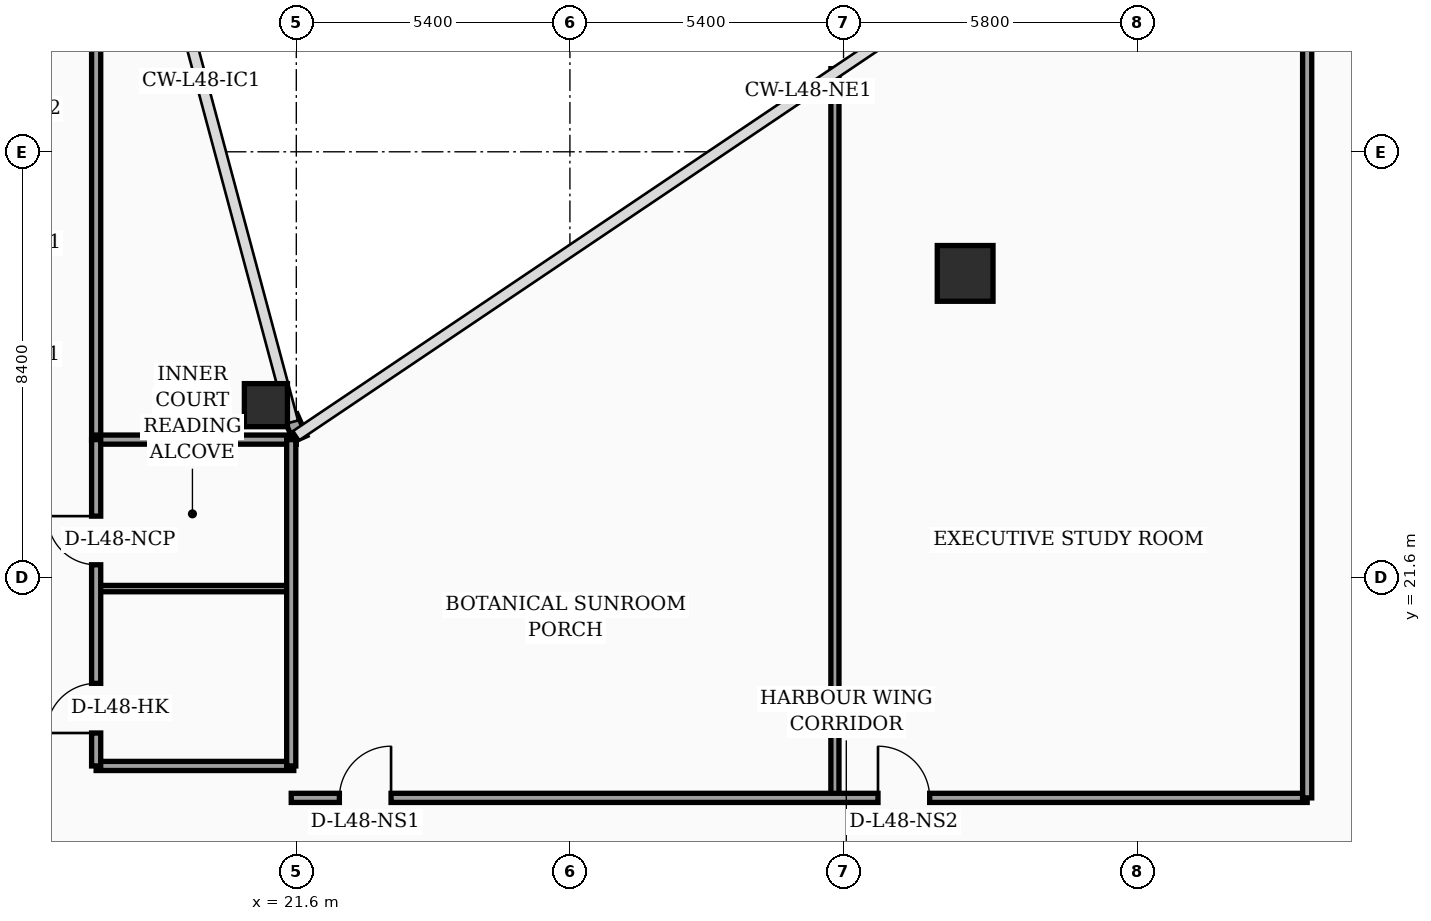
"""IFC4 building model, lengths in metres.
Left out: names, types, materials, properties, quantities, classifications, styles, units other than length and angle.
Written with IfcOpenShell. Run it as: python <this file> out.ifc"""

import sys

from ifc_helpers import new_model, si_unit, direction, frame, frame_2d, origin, origin_2d, place, context, subcontext, project, spatial, rectangle, hollow_rectangle, circle, extrude, element, fill, save


model = new_model("IFC4")
c1 = context("Model", 3, precision=1e-05, world=origin(), true_north=direction((0.0, 1.0)))
c2 = subcontext(c1, "Body", "Model", "MODEL_VIEW")
j1 = project(units=[si_unit("LENGTHUNIT", "METRE"), si_unit("PLANEANGLEUNIT", "RADIAN")], contexts=[c1])
p1 = place(None, origin())
s1 = spatial("IfcSite", under=j1, at=p1, CompositionType="ELEMENT")
p2 = place(p1, origin())
s2 = spatial("IfcBuilding", under=s1, at=p2, CompositionType="ELEMENT")
p3 = place(p2, frame((0.0, 0.0, 195.1)))
s3 = spatial("IfcBuildingStorey", under=s2, at=p3, CompositionType="ELEMENT", Elevation=195.1)
p4 = place(p3, frame((21.0, 25.0, 0.0), z_axis=(0.0, 0.0, 1.0), x_axis=(1.0, 0.0, 0.0)))
e1 = element("IfcColumn", 1, at=p4, inside=s3, PredefinedType="COLUMN", context=c2, shape_type="SweptSolid", body=[
    extrude(hollow_rectangle(XDim=0.85, YDim=0.85, WallThickness=0.036, at=origin_2d()), origin(), (0.0, 0.0, 1.0), 4.05),
])
p5 = place(p3, frame((34.8, 27.6, 0.0), z_axis=(0.0, 0.0, 1.0), x_axis=(1.0, 0.0, 0.0)))
e2 = element("IfcColumn", 2, at=p5, inside=s3, PredefinedType="COLUMN", context=c2, shape_type="SweptSolid", body=[
    extrude(circle(Radius=0.55, at=origin_2d()), origin(), (0.0, 0.0, 1.0), 4.05),
])
p6 = place(p3, frame((21.68, 24.34, 0.0), z_axis=(0.0, 0.0, 1.0), x_axis=(-0.40758134973, 0.913168901875, 0.0)))
e3 = element("IfcWall", 3, at=p6, inside=s3, PredefinedType="SOLIDWALL", context=c2, shape_type="SweptSolid", body=[
    extrude(rectangle(XDim=0.471, YDim=0.28, at=frame_2d((0.235, 0.0))), origin(), (0.0, 0.0, 1.0), 4.05),
])
p7 = place(p3, frame((17.65, 24.3, 0.0), z_axis=(0.0, 0.0, 1.0), x_axis=(0.0, 1.0, 0.0)))
e4 = element("IfcWall", 4, at=p7, inside=s3, PredefinedType="PARTITIONING", context=c2, shape_type="SweptSolid", body=[
    extrude(rectangle(XDim=18.15, YDim=0.18, at=frame_2d((9.075, 0.0))), origin(), (0.0, 0.0, 1.0), 3.45),
])
p8 = place(p3, frame((17.65, 17.88, 0.0), z_axis=(0.0, 0.0, 1.0), x_axis=(1.0, 0.0, 0.0)))
e5 = element("IfcWall", 5, at=p8, inside=s3, PredefinedType="PARTITIONING", context=c2, shape_type="SweptSolid", body=[
    extrude(rectangle(XDim=3.9, YDim=0.18, at=frame_2d((1.95, 0.0))), origin(), (0.0, 0.0, 1.0), 4.05),
])
p9 = place(p3, frame((17.65, 21.38, 0.0), z_axis=(0.0, 0.0, 1.0), x_axis=(1.0, 0.0, 0.0)))
e6 = element("IfcWall", 6, at=p9, inside=s3, PredefinedType="PARTITIONING", context=c2, shape_type="SweptSolid", body=[
    extrude(rectangle(XDim=3.9, YDim=0.125, at=frame_2d((1.95, 0.0))), origin(), (0.0, 0.0, 1.0), 4.05),
])
p10 = place(p3, frame((17.65, 24.32, 0.0), z_axis=(0.0, 0.0, 1.0), x_axis=(1.0, 0.0, 0.0)))
e7 = element("IfcWall", 7, at=p10, inside=s3, PredefinedType="PARTITIONING", context=c2, shape_type="SweptSolid", body=[
    extrude(rectangle(XDim=3.95, YDim=0.18, at=frame_2d((1.975, 0.0))), origin(), (0.0, 0.0, 1.0), 4.05),
])
p11 = place(p3, frame((21.5, 17.88, 0.0), z_axis=(0.0, 0.0, 1.0), x_axis=(0.0, 1.0, 0.0)))
e8 = element("IfcWall", 8, at=p11, inside=s3, PredefinedType="PARTITIONING", context=c2, shape_type="SweptSolid", body=[
    extrude(rectangle(XDim=6.44, YDim=0.18, at=frame_2d((3.22, 0.0))), origin(), (0.0, 0.0, 1.0), 4.05),
])
p12 = place(p3, frame((17.65, 17.88, 0.0), z_axis=(0.0, 0.0, 1.0), x_axis=(0.0, 1.0, 0.0)))
e9 = element("IfcWall", 9, at=p12, inside=s3, PredefinedType="PARTITIONING", context=c2, shape_type="SweptSolid", body=[
    extrude(rectangle(XDim=6.44, YDim=0.18, at=frame_2d((3.22, 0.0))), origin(), (0.0, 0.0, 1.0), 4.05),
])
p13 = place(p12, frame((0.65, 0.0, 0.0)))
e10 = element("IfcOpeningElement", 10, at=p13, cuts=e9, PredefinedType="OPENING", context=c2, shape_type="SweptSolid", body=[
    extrude(rectangle(XDim=0.98, YDim=2.15, at=frame_2d((0.49, 1.075))), frame((0.0, 0.1, 0.0), z_axis=(0.0, -1.0, 0.0), x_axis=(1.0, 0.0, 0.0)), (0.0, 0.0, 1.0), 0.2),
])
p14 = place(p12, frame((3.97, 0.0, 0.0)))
e11 = element("IfcOpeningElement", 11, at=p14, cuts=e9, PredefinedType="OPENING", context=c2, shape_type="SweptSolid", body=[
    extrude(rectangle(XDim=0.96, YDim=2.2, at=frame_2d((0.48, 1.1))), frame((0.0, 0.1, 0.0), z_axis=(0.0, -1.0, 0.0), x_axis=(1.0, 0.0, 0.0)), (0.0, 0.0, 1.0), 0.2),
])
p15 = place(p3, frame((32.23, 17.25, 0.0), z_axis=(0.0, 0.0, 1.0), x_axis=(0.0, 1.0, 0.0)))
e12 = element("IfcWall", 12, at=p15, inside=s3, PredefinedType="PARTITIONING", context=c2, shape_type="SweptSolid", body=[
    extrude(rectangle(XDim=14.39, YDim=0.16, at=frame_2d((7.195, 0.0))), origin(), (0.0, 0.0, 1.0), 2.35),
])
p16 = place(p3, frame((21.5, 17.25, 0.0), z_axis=(0.0, 0.0, 1.0), x_axis=(1.0, 0.0, 0.0)))
e13 = element("IfcWall", 13, at=p16, inside=s3, PredefinedType="PARTITIONING", context=c2, shape_type="SweptSolid", body=[
    extrude(rectangle(XDim=20.05, YDim=0.18, at=frame_2d((10.025, 0.0))), origin(), (0.0, 0.0, 1.0), 2.35),
])
p17 = place(p16, frame((0.95, 0.0, 0.0)))
e14 = element("IfcOpeningElement", 14, at=p17, cuts=e13, PredefinedType="OPENING", context=c2, shape_type="SweptSolid", body=[
    extrude(rectangle(XDim=1.02, YDim=2.2, at=frame_2d((0.51, 1.1))), frame((0.0, 0.1, 0.0), z_axis=(0.0, -1.0, 0.0), x_axis=(1.0, 0.0, 0.0)), (0.0, 0.0, 1.0), 0.2),
])
p18 = place(p16, frame((11.58, 0.0, 0.0)))
e15 = element("IfcOpeningElement", 15, at=p18, cuts=e13, PredefinedType="OPENING", context=c2, shape_type="SweptSolid", body=[
    extrude(rectangle(XDim=1.02, YDim=2.2, at=frame_2d((0.51, 1.1))), frame((0.0, 0.1, 0.0), z_axis=(0.0, -1.0, 0.0), x_axis=(1.0, 0.0, 0.0)), (0.0, 0.0, 1.0), 0.2),
])
p19 = place(p3, frame((41.55, 17.25, 0.0), z_axis=(0.0, 0.0, 1.0), x_axis=(0.0, 1.0, 0.0)))
e16 = element("IfcWall", 16, at=p19, inside=s3, PredefinedType="PARTITIONING", context=c2, shape_type="SweptSolid", body=[
    extrude(rectangle(XDim=20.66, YDim=0.18, at=frame_2d((10.33, 0.0))), origin(), (0.0, 0.0, 1.0), 2.35),
])
p20 = place(p13, origin())
e17 = element("IfcDoor", 17, at=p20, inside=s3, OperationType="SINGLE_SWING_LEFT", PredefinedType="DOOR", context=c2, shape_type="SweptSolid", body=[
    extrude(rectangle(XDim=0.98, YDim=2.15, at=frame_2d((0.49, 1.075))), frame((0.0, 0.025, 0.0), z_axis=(0.0, -1.0, 0.0), x_axis=(1.0, 0.0, 0.0)), (0.0, 0.0, 1.0), 0.05),
])
fill(e10, e17)
p21 = place(p14, origin())
e18 = element("IfcDoor", 18, at=p21, inside=s3, OperationType="SINGLE_SWING_RIGHT", PredefinedType="DOOR", context=c2, shape_type="SweptSolid", body=[
    extrude(rectangle(XDim=0.96, YDim=2.2, at=frame_2d((0.48, 1.1))), frame((0.0, 0.025, 0.0), z_axis=(0.0, -1.0, 0.0), x_axis=(1.0, 0.0, 0.0)), (0.0, 0.0, 1.0), 0.05),
])
fill(e11, e18)
p22 = place(p17, origin())
e19 = element("IfcDoor", 19, at=p22, inside=s3, OperationType="SINGLE_SWING_RIGHT", PredefinedType="DOOR", context=c2, shape_type="SweptSolid", body=[
    extrude(rectangle(XDim=1.02, YDim=2.2, at=frame_2d((0.51, 1.1))), frame((0.0, 0.025, 0.0), z_axis=(0.0, -1.0, 0.0), x_axis=(1.0, 0.0, 0.0)), (0.0, 0.0, 1.0), 0.05),
])
fill(e14, e19)
p23 = place(p18, origin())
e20 = element("IfcDoor", 20, at=p23, inside=s3, OperationType="SINGLE_SWING_LEFT", PredefinedType="DOOR", context=c2, shape_type="SweptSolid", body=[
    extrude(rectangle(XDim=1.02, YDim=2.2, at=frame_2d((0.51, 1.1))), frame((0.0, 0.025, 0.0), z_axis=(0.0, -1.0, 0.0), x_axis=(1.0, 0.0, 0.0)), (0.0, 0.0, 1.0), 0.05),
])
fill(e15, e20)
save(model, sys.argv[1])
